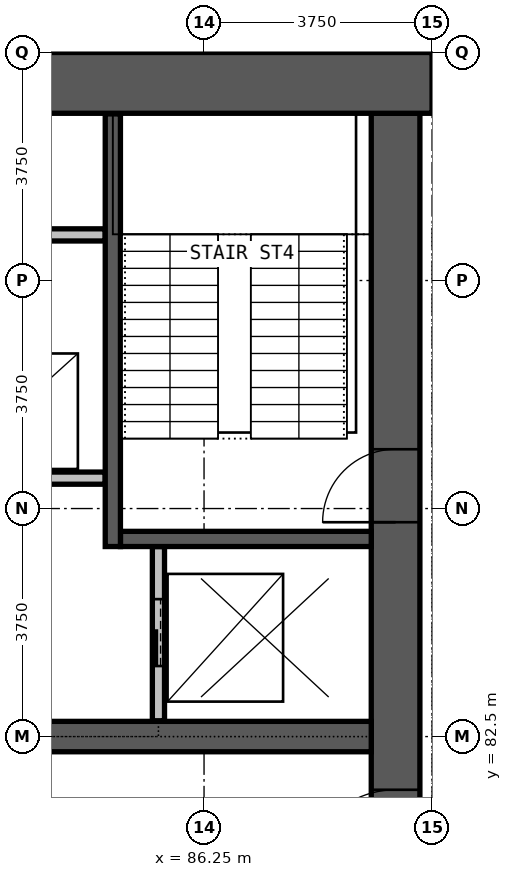
"""IFC4 building model, lengths in metres.
Left out: names, types, materials, properties, quantities, classifications, styles, units other than length and angle.
Written with IfcOpenShell. Run it as: python <this file> out.ifc"""

import sys

from ifc_helpers import new_model, si_unit, direction, frame, frame_2d, origin, place, context, subcontext, project, spatial, rectangle, extrude, element, fill, save


model = new_model("IFC4")
c1 = context("Model", 3, precision=1e-05, world=origin(), true_north=direction((0.0, 1.0)))
c2 = subcontext(c1, "Body", "Model", "MODEL_VIEW")
j1 = project(units=[si_unit("LENGTHUNIT", "METRE"), si_unit("PLANEANGLEUNIT", "RADIAN")], contexts=[c1])
p1 = place(None, origin())
s1 = spatial("IfcSite", under=j1, at=p1, CompositionType="ELEMENT")
p2 = place(p1, origin())
s2 = spatial("IfcBuilding", under=s1, at=p2, CompositionType="ELEMENT")
p3 = place(p2, frame((0.0, 0.0, 143.2)))
s3 = spatial("IfcBuildingStorey", under=s2, at=p3, CompositionType="ELEMENT", Elevation=143.2)
p4 = place(p3, frame((89.4, 72.25, 0.0), z_axis=(0.0, 0.0, 1.0), x_axis=(0.0, 1.0, 0.0)))
e1 = element("IfcWall", 1, at=p4, inside=s3, PredefinedType="SHEAR", context=c2, shape_type="SweptSolid", body=[
    extrude(rectangle(XDim=20.5, YDim=0.8, at=frame_2d((10.25, 0.0))), origin(), (0.0, 0.0, 1.0), 4.5),
])
p5 = place(p4, frame((0.275, 0.0, 0.0)))
e2 = element("IfcOpeningElement", 2, at=p5, cuts=e1, PredefinedType="OPENING", context=c2, shape_type="SweptSolid", body=[
    extrude(rectangle(XDim=1.2, YDim=2.2, at=frame_2d((0.6, 1.1))), frame((0.0, 0.41, 0.0), z_axis=(0.0, -1.0, 0.0), x_axis=(1.0, 0.0, 0.0)), (0.0, 0.0, 1.0), 0.82),
])
p6 = place(p4, frame((13.775, 0.0, 0.0)))
e3 = element("IfcOpeningElement", 3, at=p6, cuts=e1, PredefinedType="OPENING", context=c2, shape_type="SweptSolid", body=[
    extrude(rectangle(XDim=1.2, YDim=2.2, at=frame_2d((0.6, 1.1))), frame((0.0, 0.41, 0.0), z_axis=(0.0, -1.0, 0.0), x_axis=(1.0, 0.0, 0.0)), (0.0, 0.0, 1.0), 0.82),
])
p7 = place(p4, frame((7.875, 0.0, 0.0)))
e4 = element("IfcOpeningElement", 4, at=p7, cuts=e1, PredefinedType="OPENING", context=c2, shape_type="SweptSolid", body=[
    extrude(rectangle(XDim=1.5, YDim=2.2, at=frame_2d((0.75, 1.1))), frame((0.0, 0.41, 0.0), z_axis=(0.0, -1.0, 0.0), x_axis=(1.0, 0.0, 0.0)), (0.0, 0.0, 1.0), 0.82),
])
p8 = place(p3, frame((90.0, 93.25, 0.0), z_axis=(0.0, 0.0, 1.0), x_axis=(-1.0, 0.0, 0.0)))
e5 = element("IfcWall", 5, at=p8, inside=s3, PredefinedType="SHEAR", context=c2, shape_type="SweptSolid", body=[
    extrude(rectangle(XDim=30.0, YDim=1.0, at=frame_2d((15.0, 0.0))), origin(), (0.0, 0.0, 1.0), 4.5),
])
p9 = place(p3, frame((79.6, 82.5, 0.0), z_axis=(0.0, 0.0, 1.0), x_axis=(1.0, 0.0, 0.0)))
e6 = element("IfcWall", 6, at=p9, inside=s3, PredefinedType="SHEAR", context=c2, shape_type="SweptSolid", body=[
    extrude(rectangle(XDim=9.4, YDim=0.5, at=frame_2d((4.7, 0.0))), origin(), (0.0, 0.0, 1.0), 4.5),
])
p10 = place(p3, frame((75.26, 86.75, 0.0), z_axis=(0.0, 0.0, 1.0), x_axis=(1.0, 0.0, 0.0)))
e7 = element("IfcWall", 7, at=p10, inside=s3, PredefinedType="PARTITIONING", context=c2, shape_type="SweptSolid", body=[
    extrude(rectangle(XDim=9.365, YDim=0.2, at=frame_2d((4.683, 0.0))), origin(), (0.0, 0.0, 1.0), 4.2),
])
p11 = place(p10, frame((0.95, 0.0, 0.0)))
e8 = element("IfcOpeningElement", 8, at=p11, cuts=e7, PredefinedType="OPENING", context=c2, shape_type="SweptSolid", body=[
    extrude(rectangle(XDim=1.1, YDim=2.2, at=frame_2d((0.55, 1.1))), frame((0.0, 0.11, 0.0), z_axis=(0.0, -1.0, 0.0), x_axis=(1.0, 0.0, 0.0)), (0.0, 0.0, 1.0), 0.22),
])
p12 = place(p10, frame((4.09, 0.0, 0.0)))
e9 = element("IfcOpeningElement", 9, at=p12, cuts=e7, PredefinedType="OPENING", context=c2, shape_type="SweptSolid", body=[
    extrude(rectangle(XDim=1.1, YDim=2.2, at=frame_2d((0.55, 1.1))), frame((0.0, 0.11, 0.0), z_axis=(0.0, -1.0, 0.0), x_axis=(1.0, 0.0, 0.0)), (0.0, 0.0, 1.0), 0.22),
])
p13 = place(p10, frame((7.24, 0.0, 0.0)))
e10 = element("IfcOpeningElement", 10, at=p13, cuts=e7, PredefinedType="OPENING", context=c2, shape_type="SweptSolid", body=[
    extrude(rectangle(XDim=1.1, YDim=2.2, at=frame_2d((0.55, 1.1))), frame((0.0, 0.11, 0.0), z_axis=(0.0, -1.0, 0.0), x_axis=(1.0, 0.0, 0.0)), (0.0, 0.0, 1.0), 0.22),
])
p14 = place(p3, frame((75.26, 90.75, 0.0), z_axis=(0.0, 0.0, 1.0), x_axis=(1.0, 0.0, 0.0)))
e11 = element("IfcWall", 11, at=p14, inside=s3, PredefinedType="PARTITIONING", context=c2, shape_type="SweptSolid", body=[
    extrude(rectangle(XDim=9.365, YDim=0.2, at=frame_2d((4.683, 0.0))), origin(), (0.0, 0.0, 1.0), 4.2),
])
p15 = place(p3, frame((85.5, 82.76, 0.0), z_axis=(0.0, 0.0, 1.0), x_axis=(0.0, 1.0, 0.0)))
e12 = element("IfcWall", 12, at=p15, inside=s3, PredefinedType="PARTITIONING", context=c2, shape_type="SweptSolid", body=[
    extrude(rectangle(XDim=2.865, YDim=0.2, at=frame_2d((1.433, 0.0))), origin(), (0.0, 0.0, 1.0), 4.2),
])
p16 = place(p15, frame((0.9, 0.0, 0.0)))
e13 = element("IfcOpeningElement", 13, at=p16, cuts=e12, PredefinedType="OPENING", context=c2, shape_type="SweptSolid", body=[
    extrude(rectangle(XDim=1.1, YDim=2.2, at=frame_2d((0.55, 1.1))), frame((0.0, 0.11, 0.0), z_axis=(0.0, -1.0, 0.0), x_axis=(1.0, 0.0, 0.0)), (0.0, 0.0, 1.0), 0.22),
])
p17 = place(p3, frame((84.875, 85.75, 0.0), z_axis=(0.0, 0.0, 1.0), x_axis=(1.0, 0.0, 0.0)))
e14 = element("IfcWall", 14, at=p17, inside=s3, PredefinedType="PARTITIONING", context=c2, shape_type="SweptSolid", body=[
    extrude(rectangle(XDim=4.125, YDim=0.25, at=frame_2d((2.062, 0.0))), origin(), (0.0, 0.0, 1.0), 4.2),
])
p18 = place(p3, frame((84.75, 85.625, 0.0), z_axis=(0.0, 0.0, 1.0), x_axis=(0.0, 1.0, 0.0)))
e15 = element("IfcWall", 15, at=p18, inside=s3, PredefinedType="PARTITIONING", context=c2, shape_type="SweptSolid", body=[
    extrude(rectangle(XDim=7.115, YDim=0.25, at=frame_2d((3.558, 0.0))), origin(), (0.0, 0.0, 1.0), 4.2),
])
p19 = place(p16, origin())
e16 = element("IfcDoor", 16, at=p19, inside=s3, OperationType="DOUBLE_DOOR_SLIDING", PredefinedType="DOOR", context=c2, shape_type="SweptSolid", body=[
    extrude(rectangle(XDim=1.1, YDim=2.2, at=frame_2d((0.55, 1.1))), frame((0.0, 0.025, 0.0), z_axis=(0.0, -1.0, 0.0), x_axis=(1.0, 0.0, 0.0)), (0.0, 0.0, 1.0), 0.05),
])
fill(e13, e16)
p20 = place(p6, origin())
e17 = element("IfcDoor", 17, at=p20, inside=s3, OperationType="SINGLE_SWING_RIGHT", PredefinedType="DOOR", context=c2, shape_type="SweptSolid", body=[
    extrude(rectangle(XDim=1.2, YDim=2.2, at=frame_2d((0.6, 1.1))), frame((0.0, 0.025, 0.0), z_axis=(0.0, -1.0, 0.0), x_axis=(1.0, 0.0, 0.0)), (0.0, 0.0, 1.0), 0.05),
])
fill(e3, e17)
p21 = place(p7, origin())
e18 = element("IfcDoor", 18, at=p21, inside=s3, OperationType="DOUBLE_DOOR_SINGLE_SWING", PredefinedType="DOOR", context=c2, shape_type="SweptSolid", body=[
    extrude(rectangle(XDim=1.5, YDim=2.2, at=frame_2d((0.75, 1.1))), frame((0.0, 0.025, 0.0), z_axis=(0.0, -1.0, 0.0), x_axis=(1.0, 0.0, 0.0)), (0.0, 0.0, 1.0), 0.05),
])
fill(e4, e18)
save(model, sys.argv[1])
